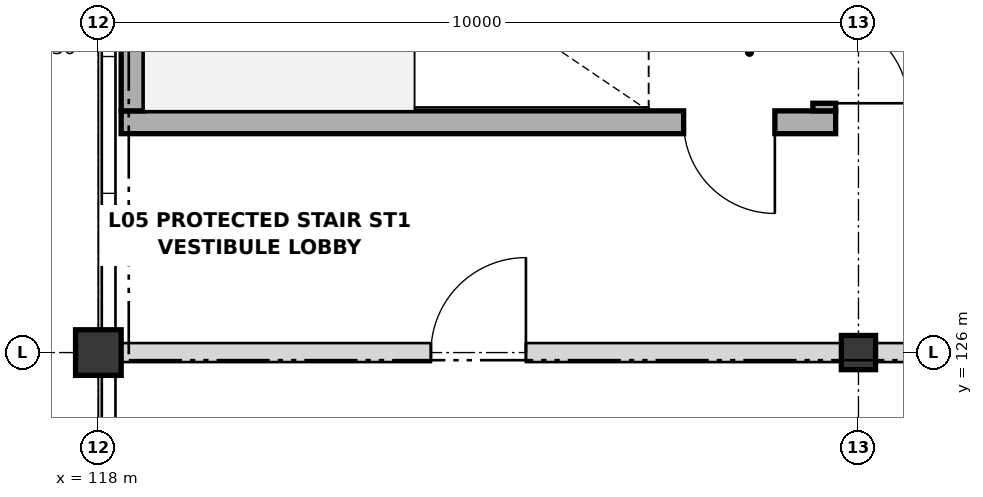
"""IFC4 building model, lengths in metres.
Left out: names, types, materials, properties, quantities, classifications, styles, units other than length and angle.
Written with IfcOpenShell. Run it as: python <this file> out.ifc"""

import sys

from ifc_helpers import new_model, si_unit, direction, frame, frame_2d, origin, origin_2d, place, context, subcontext, project, spatial, rectangle, extrude, element, fill, save


model = new_model("IFC4")
c1 = context("Model", 3, precision=1e-05, world=origin(), true_north=direction((0.0, 1.0)))
c2 = subcontext(c1, "Body", "Model", "MODEL_VIEW")
j1 = project(units=[si_unit("LENGTHUNIT", "METRE"), si_unit("PLANEANGLEUNIT", "RADIAN")], contexts=[c1])
p1 = place(None, origin())
s1 = spatial("IfcSite", under=j1, at=p1, CompositionType="ELEMENT")
p2 = place(p1, origin())
s2 = spatial("IfcBuilding", under=s1, at=p2, CompositionType="ELEMENT")
p3 = place(p2, frame((0.0, 0.0, 22.8)))
s3 = spatial("IfcBuildingStorey", under=s2, at=p3, CompositionType="ELEMENT", Elevation=22.8)
p4 = place(p3, frame((118.0, 126.0, 0.0), z_axis=(0.0, 0.0, 1.0), x_axis=(1.0, 0.0, 0.0)))
e1 = element("IfcColumn", 1, at=p4, inside=s3, PredefinedType="COLUMN", context=c2, shape_type="SweptSolid", body=[
    extrude(rectangle(XDim=0.6, YDim=0.6, at=origin_2d()), origin(), (0.0, 0.0, 1.0), 4.2),
])
p5 = place(p3, frame((128.0, 126.0, 0.0), z_axis=(0.0, 0.0, 1.0), x_axis=(1.0, 0.0, 0.0)))
e2 = element("IfcColumn", 2, at=p5, inside=s3, PredefinedType="COLUMN", context=c2, shape_type="SweptSolid", body=[
    extrude(rectangle(XDim=0.45, YDim=0.45, at=origin_2d()), origin(), (0.0, 0.0, 1.0), 4.2),
])
p6 = place(p3, frame((127.7, 129.03, 0.0), z_axis=(0.0, 0.0, 1.0), x_axis=(-1.0, 0.0, 0.0)))
e3 = element("IfcWall", 3, at=p6, inside=s3, PredefinedType="SHEAR", context=c2, shape_type="SweptSolid", body=[
    extrude(rectangle(XDim=9.4, YDim=0.3, at=frame_2d((4.7, 0.0))), origin(), (0.0, 0.0, 1.0), 4.2),
])
p7 = place(p6, frame((0.8, 0.0, 0.0)))
e4 = element("IfcOpeningElement", 4, at=p7, cuts=e3, PredefinedType="OPENING", context=c2, shape_type="SweptSolid", body=[
    extrude(rectangle(XDim=1.2, YDim=2.15, at=frame_2d((0.6, 1.075))), frame((0.0, 0.16, 0.0), z_axis=(0.0, -1.0, 0.0), x_axis=(1.0, 0.0, 0.0)), (0.0, 0.0, 1.0), 0.32),
])
p8 = place(p3, frame((127.55, 133.68, 0.0), z_axis=(0.0, 0.0, 1.0), x_axis=(0.0, -1.0, 0.0)))
e5 = element("IfcWall", 5, at=p8, inside=s3, PredefinedType="SHEAR", context=c2, shape_type="SweptSolid", body=[
    extrude(rectangle(XDim=4.5, YDim=0.3, at=frame_2d((2.25, 0.0))), origin(), (0.0, 0.0, 1.0), 4.2),
])
p9 = place(p8, frame((3.3, 0.0, 0.0)))
e6 = element("IfcOpeningElement", 6, at=p9, cuts=e5, PredefinedType="OPENING", context=c2, shape_type="SweptSolid", body=[
    extrude(rectangle(XDim=1.1, YDim=2.15, at=frame_2d((0.55, 1.075))), frame((0.0, 0.16, 0.0), z_axis=(0.0, -1.0, 0.0), x_axis=(1.0, 0.0, 0.0)), (0.0, 0.0, 1.0), 0.32),
])
p10 = place(p3, frame((118.45, 129.18, 0.0), z_axis=(0.0, 0.0, 1.0), x_axis=(0.0, 1.0, 0.0)))
e7 = element("IfcWall", 7, at=p10, inside=s3, PredefinedType="SHEAR", context=c2, shape_type="SweptSolid", body=[
    extrude(rectangle(XDim=4.5, YDim=0.3, at=frame_2d((2.25, 0.0))), origin(), (0.0, 0.0, 1.0), 4.2),
])
p11 = place(p3, frame((118.305, 126.0, 0.0), z_axis=(0.0, 0.0, 1.0), x_axis=(1.0, 0.0, 0.0)))
e8 = element("IfcWall", 8, at=p11, inside=s3, PredefinedType="PARTITIONING", context=c2, shape_type="SweptSolid", body=[
    extrude(rectangle(XDim=9.465, YDim=0.25, at=frame_2d((4.732, 0.0))), origin(), (0.0, 0.0, 1.0), 3.188),
])
p12 = place(p11, frame((4.07, 0.0, 0.0)))
e9 = element("IfcOpeningElement", 9, at=p12, cuts=e8, PredefinedType="OPENING", context=c2, shape_type="SweptSolid", body=[
    extrude(rectangle(XDim=1.25, YDim=2.15, at=frame_2d((0.625, 1.075))), frame((0.0, 0.135, 0.0), z_axis=(0.0, -1.0, 0.0), x_axis=(1.0, 0.0, 0.0)), (0.0, 0.0, 1.0), 0.27),
])
p13 = place(p3, frame((128.23, 126.0, 0.0), z_axis=(0.0, 0.0, 1.0), x_axis=(1.0, 0.0, 0.0)))
e10 = element("IfcWall", 10, at=p13, inside=s3, PredefinedType="PARTITIONING", context=c2, shape_type="SweptSolid", body=[
    extrude(rectangle(XDim=9.54, YDim=0.25, at=frame_2d((4.77, 0.0))), origin(), (0.0, 0.0, 1.0), 3.188),
])
p14 = place(p13, frame((1.945, 0.0, 0.0)))
e11 = element("IfcOpeningElement", 11, at=p14, cuts=e10, PredefinedType="OPENING", context=c2, shape_type="SweptSolid", body=[
    extrude(rectangle(XDim=1.25, YDim=2.15, at=frame_2d((0.625, 1.075))), frame((0.0, 0.135, 0.0), z_axis=(0.0, -1.0, 0.0), x_axis=(1.0, 0.0, 0.0)), (0.0, 0.0, 1.0), 0.27),
])
p15 = place(p13, frame((6.42, 0.0, 0.0)))
e12 = element("IfcOpeningElement", 12, at=p15, cuts=e10, PredefinedType="OPENING", context=c2, shape_type="SweptSolid", body=[
    extrude(rectangle(XDim=1.1, YDim=2.15, at=frame_2d((0.55, 1.075))), frame((0.0, 0.135, 0.0), z_axis=(0.0, -1.0, 0.0), x_axis=(1.0, 0.0, 0.0)), (0.0, 0.0, 1.0), 0.27),
])
p16 = place(p7, origin())
e13 = element("IfcDoor", 13, at=p16, inside=s3, OperationType="SINGLE_SWING_LEFT", PredefinedType="DOOR", context=c2, shape_type="SweptSolid", body=[
    extrude(rectangle(XDim=1.2, YDim=2.15, at=frame_2d((0.6, 1.075))), frame((0.0, 0.025, 0.0), z_axis=(0.0, -1.0, 0.0), x_axis=(1.0, 0.0, 0.0)), (0.0, 0.0, 1.0), 0.05),
])
fill(e4, e13)
p17 = place(p9, origin())
e14 = element("IfcDoor", 14, at=p17, inside=s3, OperationType="SINGLE_SWING_RIGHT", PredefinedType="DOOR", context=c2, shape_type="SweptSolid", body=[
    extrude(rectangle(XDim=1.1, YDim=2.15, at=frame_2d((0.55, 1.075))), frame((0.0, 0.025, 0.0), z_axis=(0.0, -1.0, 0.0), x_axis=(1.0, 0.0, 0.0)), (0.0, 0.0, 1.0), 0.05),
])
fill(e6, e14)
p18 = place(p12, origin())
e15 = element("IfcDoor", 15, at=p18, inside=s3, OperationType="SINGLE_SWING_RIGHT", PredefinedType="DOOR", context=c2, shape_type="SweptSolid", body=[
    extrude(rectangle(XDim=1.25, YDim=2.15, at=frame_2d((0.625, 1.075))), frame((0.0, 0.025, 0.0), z_axis=(0.0, -1.0, 0.0), x_axis=(1.0, 0.0, 0.0)), (0.0, 0.0, 1.0), 0.05),
])
fill(e9, e15)
save(model, sys.argv[1])
